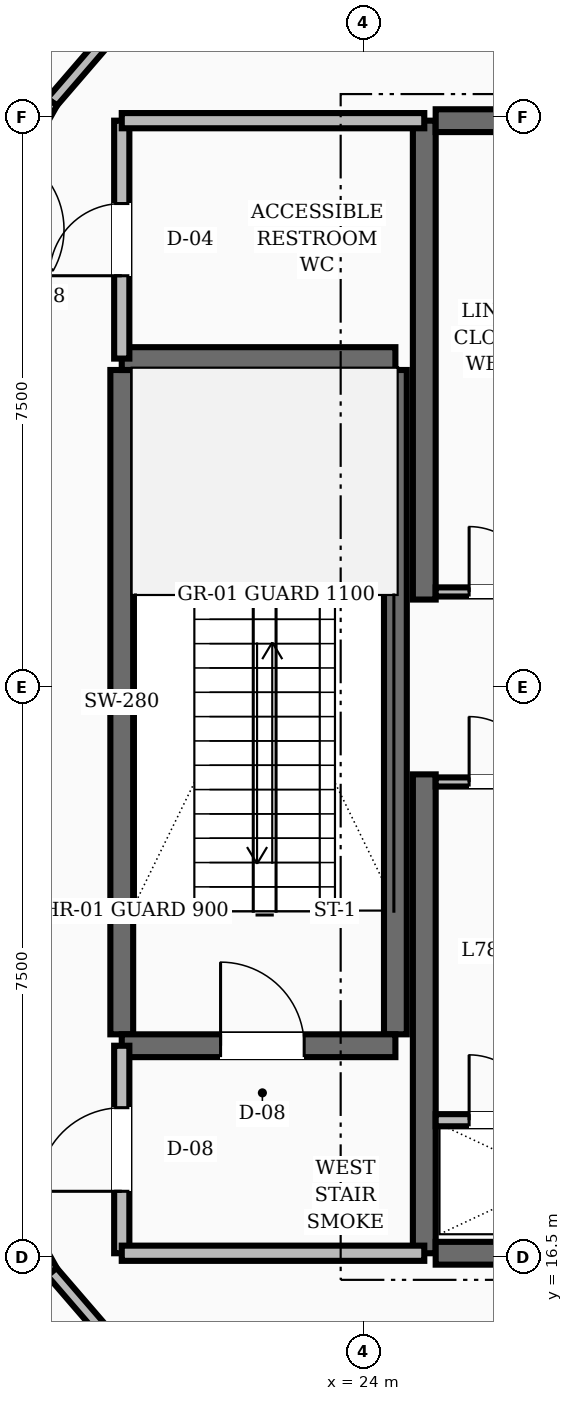
"""IFC4 building model, lengths in metres.
Left out: names, types, materials, properties, quantities, classifications, styles, units other than length and angle.
Written with IfcOpenShell. Run it as: python <this file> out.ifc"""

import sys

from ifc_helpers import new_model, si_unit, direction, frame, frame_2d, origin, place, context, subcontext, project, spatial, rectangle, extrude, element, fill, save


model = new_model("IFC4")
c1 = context("Model", 3, precision=1e-05, world=origin(), true_north=direction((0.0, 1.0)))
c2 = subcontext(c1, "Body", "Model", "MODEL_VIEW")
j1 = project(units=[si_unit("LENGTHUNIT", "METRE"), si_unit("PLANEANGLEUNIT", "RADIAN")], contexts=[c1])
p1 = place(None, origin())
s1 = spatial("IfcSite", under=j1, at=p1, CompositionType="ELEMENT")
p2 = place(p1, origin())
s2 = spatial("IfcBuilding", under=s1, at=p2, CompositionType="ELEMENT")
p3 = place(p2, frame((0.0, 0.0, 297.6)))
s3 = spatial("IfcBuildingStorey", under=s2, at=p3, CompositionType="ELEMENT", Elevation=297.6)
for number, where, z_axis, x_axis in (
    (1, (24.8, 16.55, 0.0), (0.0, 0.0, 1.0), (0.0, 1.0, 0.0)),
    (2, (24.8, 25.15, 0.0), (0.0, 0.0, 1.0), (0.0, 1.0, 0.0)),
):
    element("IfcWall", number, at=place(p3, frame(where, z_axis=z_axis, x_axis=x_axis)), inside=s3, PredefinedType="SHEAR", context=c2, shape_type="SweptSolid", body=[
        extrude(rectangle(XDim=6.3, YDim=0.3, at=frame_2d((3.15, 0.0))), origin(), (0.0, 0.0, 1.0), 4.8),
    ])
for number, where, z_axis, x_axis in (
    (3, (24.95, 16.55, 0.0), (0.0, 0.0, 1.0), (1.0, 0.0, 0.0)),
    (4, (24.95, 31.45, 0.0), (0.0, 0.0, 1.0), (1.0, 0.0, 0.0)),
):
    element("IfcWall", number, at=place(p3, frame(where, z_axis=z_axis, x_axis=x_axis)), inside=s3, PredefinedType="SHEAR", context=c2, shape_type="SweptSolid", body=[
        extrude(rectangle(XDim=3.25, YDim=0.3, at=frame_2d((1.625, 0.0))), origin(), (0.0, 0.0, 1.0), 4.8),
    ])
for number, where, z_axis, x_axis in (
    (5, (20.82, 19.43, 0.0), (0.0, 0.0, 1.0), (0.0, 1.0, 0.0)),
    (6, (24.42, 19.43, 0.0), (0.0, 0.0, 1.0), (0.0, 1.0, 0.0)),
):
    element("IfcWall", number, at=place(p3, frame(where, z_axis=z_axis, x_axis=x_axis)), inside=s3, PredefinedType="SHEAR", context=c2, shape_type="SweptSolid", body=[
        extrude(rectangle(XDim=8.74, YDim=0.3, at=frame_2d((4.37, 0.0))), origin(), (0.0, 0.0, 1.0), 4.8),
    ])
p4 = place(p3, frame((20.82, 19.28, 0.0), z_axis=(0.0, 0.0, 1.0), x_axis=(1.0, 0.0, 0.0)))
e7 = element("IfcWall", 7, at=p4, inside=s3, PredefinedType="SHEAR", context=c2, shape_type="SweptSolid", body=[
    extrude(rectangle(XDim=3.6, YDim=0.3, at=frame_2d((1.8, 0.0))), origin(), (0.0, 0.0, 1.0), 4.8),
])
p5 = place(p4, frame((1.3, 0.0, 0.0)))
e8 = element("IfcOpeningElement", 8, at=p5, cuts=e7, PredefinedType="OPENING", context=c2, shape_type="SweptSolid", body=[
    extrude(rectangle(XDim=1.1, YDim=2.1, at=frame_2d((0.55, 1.05))), frame((0.0, 0.16, 0.0), z_axis=(0.0, -1.0, 0.0), x_axis=(1.0, 0.0, 0.0)), (0.0, 0.0, 1.0), 0.32),
])
p6 = place(p3, frame((20.82, 28.32, 0.0), z_axis=(0.0, 0.0, 1.0), x_axis=(1.0, 0.0, 0.0)))
e9 = element("IfcWall", 9, at=p6, inside=s3, PredefinedType="SHEAR", context=c2, shape_type="SweptSolid", body=[
    extrude(rectangle(XDim=3.6, YDim=0.3, at=frame_2d((1.8, 0.0))), origin(), (0.0, 0.0, 1.0), 4.8),
])
p7 = place(p3, frame((20.82, 16.55, 0.0), z_axis=(0.0, 0.0, 1.0), x_axis=(0.0, 1.0, 0.0)))
e10 = element("IfcWall", 10, at=p7, inside=s3, PredefinedType="SOLIDWALL", context=c2, shape_type="SweptSolid", body=[
    extrude(rectangle(XDim=2.73, YDim=0.2, at=frame_2d((1.365, 0.0))), origin(), (0.0, 0.0, 1.0), 3.71),
])
p8 = place(p7, frame((0.815, 0.0, 0.0)))
e11 = element("IfcOpeningElement", 11, at=p8, cuts=e10, PredefinedType="OPENING", context=c2, shape_type="SweptSolid", body=[
    extrude(rectangle(XDim=1.1, YDim=2.1, at=frame_2d((0.55, 1.05))), frame((0.0, 0.11, 0.0), z_axis=(0.0, -1.0, 0.0), x_axis=(1.0, 0.0, 0.0)), (0.0, 0.0, 1.0), 0.22),
])
p9 = place(p3, frame((20.82, 16.55, 0.0), z_axis=(0.0, 0.0, 1.0), x_axis=(1.0, 0.0, 0.0)))
e12 = element("IfcWall", 12, at=p9, inside=s3, PredefinedType="SOLIDWALL", context=c2, shape_type="SweptSolid", body=[
    extrude(rectangle(XDim=3.98, YDim=0.2, at=frame_2d((1.99, 0.0))), origin(), (0.0, 0.0, 1.0), 3.71),
])
p10 = place(p3, frame((20.82, 28.32, 0.0), z_axis=(0.0, 0.0, 1.0), x_axis=(0.0, 1.0, 0.0)))
e13 = element("IfcWall", 13, at=p10, inside=s3, PredefinedType="SOLIDWALL", context=c2, shape_type="SweptSolid", body=[
    extrude(rectangle(XDim=3.13, YDim=0.2, at=frame_2d((1.565, 0.0))), origin(), (0.0, 0.0, 1.0), 3.71),
])
p11 = place(p10, frame((1.09, 0.0, 0.0)))
e14 = element("IfcOpeningElement", 14, at=p11, cuts=e13, PredefinedType="OPENING", context=c2, shape_type="SweptSolid", body=[
    extrude(rectangle(XDim=0.95, YDim=2.1, at=frame_2d((0.475, 1.05))), frame((0.0, 0.11, 0.0), z_axis=(0.0, -1.0, 0.0), x_axis=(1.0, 0.0, 0.0)), (0.0, 0.0, 1.0), 0.22),
])
p12 = place(p3, frame((20.82, 31.45, 0.0), z_axis=(0.0, 0.0, 1.0), x_axis=(1.0, 0.0, 0.0)))
e15 = element("IfcWall", 15, at=p12, inside=s3, PredefinedType="SOLIDWALL", context=c2, shape_type="SweptSolid", body=[
    extrude(rectangle(XDim=3.98, YDim=0.2, at=frame_2d((1.99, 0.0))), origin(), (0.0, 0.0, 1.0), 3.71),
])
p13 = place(p3, frame((24.95, 18.3, 0.0), z_axis=(0.0, 0.0, 1.0), x_axis=(1.0, 0.0, 0.0)))
e16 = element("IfcWall", 16, at=p13, inside=s3, PredefinedType="SOLIDWALL", context=c2, shape_type="SweptSolid", body=[
    extrude(rectangle(XDim=3.2, YDim=0.16, at=frame_2d((1.6, 0.0))), origin(), (0.0, 0.0, 1.0), 3.71),
])
p14 = place(p13, frame((0.44, 0.0, 0.0)))
e17 = element("IfcOpeningElement", 17, at=p14, cuts=e16, PredefinedType="OPENING", context=c2, shape_type="SweptSolid", body=[
    extrude(rectangle(XDim=0.86, YDim=2.05, at=frame_2d((0.43, 1.025))), frame((0.0, 0.09, 0.0), z_axis=(0.0, -1.0, 0.0), x_axis=(1.0, 0.0, 0.0)), (0.0, 0.0, 1.0), 0.18),
])
p15 = place(p3, frame((24.95, 25.25, 0.0), z_axis=(0.0, 0.0, 1.0), x_axis=(1.0, 0.0, 0.0)))
e18 = element("IfcWall", 18, at=p15, inside=s3, PredefinedType="PARTITIONING", context=c2, shape_type="SweptSolid", body=[
    extrude(rectangle(XDim=3.2, YDim=0.12, at=frame_2d((1.6, 0.0))), origin(), (0.0, 0.0, 1.0), 3.71),
])
p16 = place(p15, frame((0.44, 0.0, 0.0)))
e19 = element("IfcOpeningElement", 19, at=p16, cuts=e18, PredefinedType="OPENING", context=c2, shape_type="SweptSolid", body=[
    extrude(rectangle(XDim=0.86, YDim=2.1, at=frame_2d((0.43, 1.05))), frame((0.0, 0.07, 0.0), z_axis=(0.0, -1.0, 0.0), x_axis=(1.0, 0.0, 0.0)), (0.0, 0.0, 1.0), 0.14),
])
p17 = place(p15, frame((1.9, 0.0, 0.0)))
e20 = element("IfcOpeningElement", 20, at=p17, cuts=e18, PredefinedType="OPENING", context=c2, shape_type="SweptSolid", body=[
    extrude(rectangle(XDim=0.86, YDim=2.1, at=frame_2d((0.43, 1.05))), frame((0.0, 0.07, 0.0), z_axis=(0.0, -1.0, 0.0), x_axis=(1.0, 0.0, 0.0)), (0.0, 0.0, 1.0), 0.14),
])
p18 = place(p3, frame((24.95, 22.75, 0.0), z_axis=(0.0, 0.0, 1.0), x_axis=(1.0, 0.0, 0.0)))
e21 = element("IfcWall", 21, at=p18, inside=s3, PredefinedType="PARTITIONING", context=c2, shape_type="SweptSolid", body=[
    extrude(rectangle(XDim=3.2, YDim=0.12, at=frame_2d((1.6, 0.0))), origin(), (0.0, 0.0, 1.0), 3.71),
])
p19 = place(p18, frame((0.44, 0.0, 0.0)))
e22 = element("IfcOpeningElement", 22, at=p19, cuts=e21, PredefinedType="OPENING", context=c2, shape_type="SweptSolid", body=[
    extrude(rectangle(XDim=0.86, YDim=2.1, at=frame_2d((0.43, 1.05))), frame((0.0, 0.07, 0.0), z_axis=(0.0, -1.0, 0.0), x_axis=(1.0, 0.0, 0.0)), (0.0, 0.0, 1.0), 0.14),
])
p20 = place(p18, frame((1.9, 0.0, 0.0)))
e23 = element("IfcOpeningElement", 23, at=p20, cuts=e21, PredefinedType="OPENING", context=c2, shape_type="SweptSolid", body=[
    extrude(rectangle(XDim=0.86, YDim=2.1, at=frame_2d((0.43, 1.05))), frame((0.0, 0.07, 0.0), z_axis=(0.0, -1.0, 0.0), x_axis=(1.0, 0.0, 0.0)), (0.0, 0.0, 1.0), 0.14),
])
p21 = place(p3, frame((21.712, 33.793, 0.0), z_axis=(0.0, 0.0, 1.0), x_axis=(-0.652979703778, -0.757375406555, 0.0)))
e24 = element("IfcWall", 24, at=p21, inside=s3, PredefinedType="SOLIDWALL", context=c2, shape_type="SweptSolid", body=[
    extrude(rectangle(XDim=2.771, YDim=0.16, at=frame_2d((1.386, 0.0))), origin(), (0.0, 0.0, 1.0), 3.71),
])
p22 = place(p3, frame((19.902, 31.695, 0.0), z_axis=(0.0, 0.0, 1.0), x_axis=(-0.48962370511, -0.871933843474, 0.0)))
e25 = element("IfcWall", 25, at=p22, inside=s3, PredefinedType="SOLIDWALL", context=c2, shape_type="SweptSolid", body=[
    extrude(rectangle(XDim=2.746, YDim=0.16, at=frame_2d((1.373, 0.0))), origin(), (0.0, 0.0, 1.0), 3.71),
])
p23 = place(p22, frame((0.823, 0.0, 0.0)))
e26 = element("IfcOpeningElement", 26, at=p23, cuts=e25, PredefinedType="OPENING", context=c2, shape_type="SweptSolid", body=[
    extrude(rectangle(XDim=1.1, YDim=2.1, at=frame_2d((0.55, 1.05))), frame((0.0, 0.09, 0.0), z_axis=(0.0, -1.0, 0.0), x_axis=(1.0, 0.0, 0.0)), (0.0, 0.0, 1.0), 0.18),
])
p24 = place(p3, frame((18.558, 18.7, 0.0), z_axis=(0.0, 0.0, 1.0), x_axis=(0.48962370511, -0.871933843474, 0.0)))
e27 = element("IfcWall", 27, at=p24, inside=s3, PredefinedType="SOLIDWALL", context=c2, shape_type="SweptSolid", body=[
    extrude(rectangle(XDim=2.746, YDim=0.16, at=frame_2d((1.373, 0.0))), origin(), (0.0, 0.0, 1.0), 3.71),
])
p25 = place(p3, frame((19.902, 16.305, 0.0), z_axis=(0.0, 0.0, 1.0), x_axis=(0.652979703778, -0.757375406555, 0.0)))
e28 = element("IfcWall", 28, at=p25, inside=s3, PredefinedType="SOLIDWALL", context=c2, shape_type="SweptSolid", body=[
    extrude(rectangle(XDim=2.771, YDim=0.16, at=frame_2d((1.386, 0.0))), origin(), (0.0, 0.0, 1.0), 3.71),
])
p26 = place(p5, origin())
e29 = element("IfcDoor", 29, at=p26, inside=s3, OperationType="SINGLE_SWING_LEFT", PredefinedType="DOOR", context=c2, shape_type="SweptSolid", body=[
    extrude(rectangle(XDim=1.1, YDim=2.1, at=frame_2d((0.55, 1.05))), frame((0.0, 0.025, 0.0), z_axis=(0.0, -1.0, 0.0), x_axis=(1.0, 0.0, 0.0)), (0.0, 0.0, 1.0), 0.05),
])
fill(e8, e29)
p27 = place(p8, origin())
e30 = element("IfcDoor", 30, at=p27, inside=s3, OperationType="SINGLE_SWING_LEFT", PredefinedType="DOOR", context=c2, shape_type="SweptSolid", body=[
    extrude(rectangle(XDim=1.1, YDim=2.1, at=frame_2d((0.55, 1.05))), frame((0.0, 0.025, 0.0), z_axis=(0.0, -1.0, 0.0), x_axis=(1.0, 0.0, 0.0)), (0.0, 0.0, 1.0), 0.05),
])
fill(e11, e30)
p28 = place(p11, origin())
e31 = element("IfcDoor", 31, at=p28, inside=s3, OperationType="SINGLE_SWING_LEFT", PredefinedType="DOOR", context=c2, shape_type="SweptSolid", body=[
    extrude(rectangle(XDim=0.95, YDim=2.1, at=frame_2d((0.475, 1.05))), frame((0.0, 0.025, 0.0), z_axis=(0.0, -1.0, 0.0), x_axis=(1.0, 0.0, 0.0)), (0.0, 0.0, 1.0), 0.05),
])
fill(e14, e31)
p29 = place(p14, origin())
e32 = element("IfcDoor", 32, at=p29, inside=s3, OperationType="SINGLE_SWING_LEFT", PredefinedType="TRAPDOOR", context=c2, shape_type="SweptSolid", body=[
    extrude(rectangle(XDim=0.86, YDim=2.05, at=frame_2d((0.43, 1.025))), frame((0.0, 0.025, 0.0), z_axis=(0.0, -1.0, 0.0), x_axis=(1.0, 0.0, 0.0)), (0.0, 0.0, 1.0), 0.05),
])
fill(e17, e32)
p30 = place(p16, origin())
e33 = element("IfcDoor", 33, at=p30, inside=s3, OperationType="SINGLE_SWING_LEFT", PredefinedType="DOOR", context=c2, shape_type="SweptSolid", body=[
    extrude(rectangle(XDim=0.86, YDim=2.1, at=frame_2d((0.43, 1.05))), frame((0.0, 0.025, 0.0), z_axis=(0.0, -1.0, 0.0), x_axis=(1.0, 0.0, 0.0)), (0.0, 0.0, 1.0), 0.05),
])
fill(e19, e33)
p31 = place(p19, origin())
e34 = element("IfcDoor", 34, at=p31, inside=s3, OperationType="SINGLE_SWING_LEFT", PredefinedType="DOOR", context=c2, shape_type="SweptSolid", body=[
    extrude(rectangle(XDim=0.86, YDim=2.1, at=frame_2d((0.43, 1.05))), frame((0.0, 0.025, 0.0), z_axis=(0.0, -1.0, 0.0), x_axis=(1.0, 0.0, 0.0)), (0.0, 0.0, 1.0), 0.05),
])
fill(e22, e34)
save(model, sys.argv[1])
